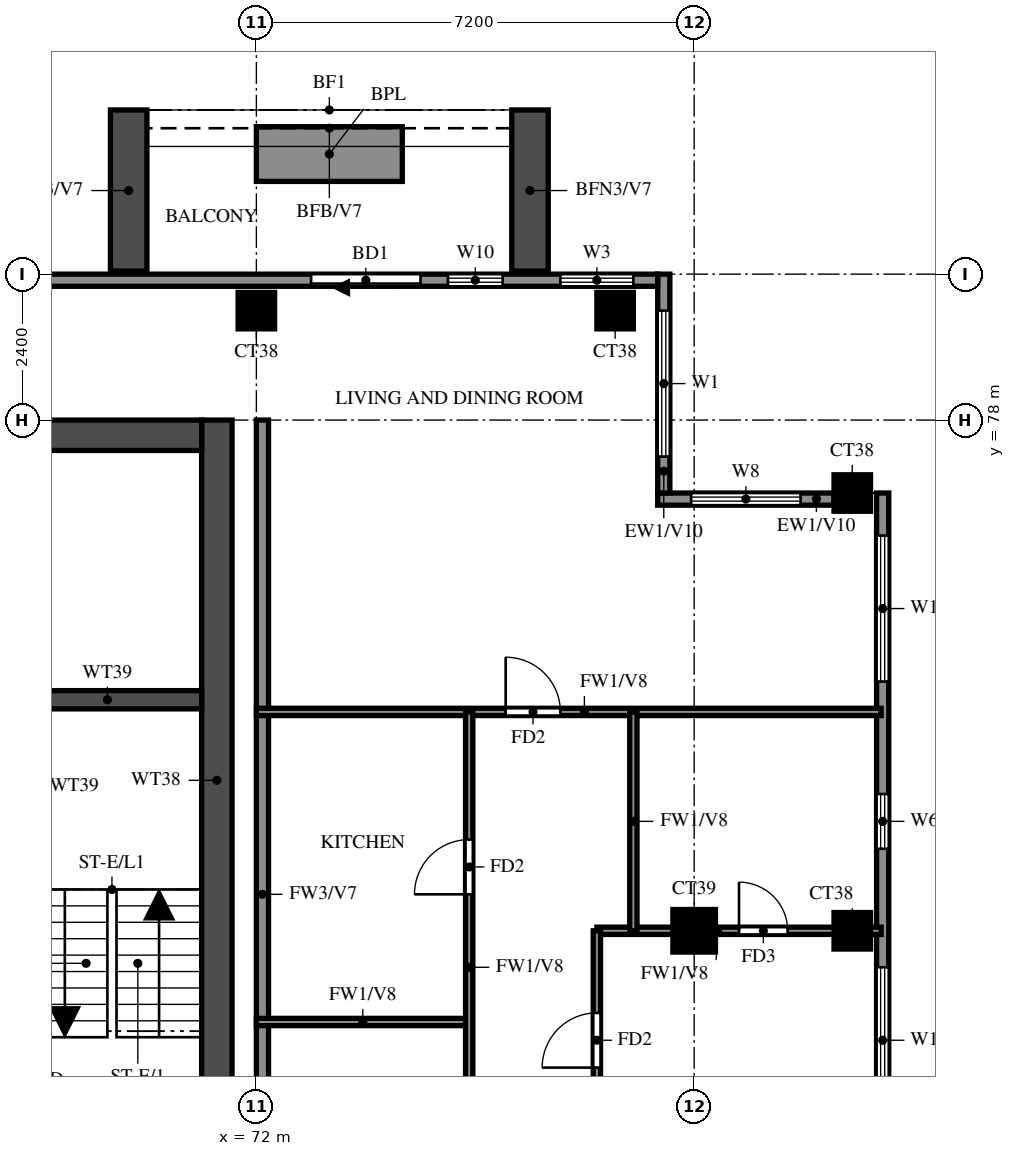
"""IFC4 building model, lengths in metres.
Left out: names, types, materials, properties, quantities, classifications, styles, units other than length and angle.
Written with IfcOpenShell. Run it as: python <this file> out.ifc"""

import sys

from ifc_helpers import new_model, si_unit, direction, frame, frame_2d, origin, origin_2d, place, context, subcontext, project, spatial, rectangle, extrude, source, transform, mapped, element, fill, save


model = new_model("IFC4")
c1 = context("Model", 3, precision=1e-05, world=origin(), true_north=direction((0.0, 1.0)))
c2 = subcontext(c1, "Body", "Model", "MODEL_VIEW")
j1 = project(units=[si_unit("LENGTHUNIT", "METRE"), si_unit("PLANEANGLEUNIT", "RADIAN")], contexts=[c1])
p1 = place(None, origin())
s1 = spatial("IfcSite", under=j1, at=p1, CompositionType="ELEMENT")
p2 = place(p1, origin())
s2 = spatial("IfcBuilding", under=s1, at=p2, CompositionType="ELEMENT")
p3 = place(p2, frame((0.0, 0.0, 267.5)))
s3 = spatial("IfcBuildingStorey", under=s2, at=p3, CompositionType="ELEMENT", Elevation=267.5)
m1 = source(origin(), c2, "Body", "SweptSolid", [
    extrude(rectangle(XDim=0.7, YDim=0.7, at=origin_2d()), origin(), (0.0, 0.0, 1.0), 3.099),
])
p4 = place(p3, frame((79.2, 69.6, 0.0), z_axis=(0.0, 0.0, 1.0), x_axis=(1.0, 0.0, 0.0)))
e1 = element("IfcColumn", 1, at=p4, inside=s3, PredefinedType="COLUMN", context=c2, shape_type="MappedRepresentation", body=[
    mapped(m1, transform((0.0, 0.0, 0.0))),
])
m2 = source(origin(), c2, "Body", "SweptSolid", [
    extrude(rectangle(XDim=0.6, YDim=0.6, at=origin_2d()), origin(), (0.0, 0.0, 1.0), 3.099),
])
for number, where, z_axis, x_axis in (
    (2, (81.8, 69.6, 0.0), (0.0, 0.0, 1.0), (1.0, 0.0, 0.0)),
    (3, (81.8, 76.8, 0.0), (0.0, 0.0, 1.0), (1.0, 0.0, 0.0)),
    (4, (72.0, 79.8, 0.0), (0.0, 0.0, 1.0), (1.0, 0.0, 0.0)),
    (5, (77.9, 79.8, 0.0), (0.0, 0.0, 1.0), (1.0, 0.0, 0.0)),
):
    element("IfcColumn", number, at=place(p3, frame(where, z_axis=z_axis, x_axis=x_axis)), inside=s3, PredefinedType="COLUMN", context=c2, shape_type="MappedRepresentation", body=[
        mapped(m2, transform((0.0, 0.0, 0.0))),
    ])
p5 = place(p3, frame((71.35, 66.15, 0.0), z_axis=(0.0, 0.0, 1.0), x_axis=(0.0, 1.0, 0.0)))
e6 = element("IfcWall", 6, at=p5, inside=s3, PredefinedType="SHEAR", context=c2, shape_type="SweptSolid", body=[
    extrude(rectangle(XDim=11.85, YDim=0.5, at=frame_2d((5.925, 0.0))), origin(), (0.0, 0.0, 1.0), 3.099),
])
p6 = place(p3, frame((29.7, 77.75, 0.0), z_axis=(0.0, 0.0, 1.0), x_axis=(1.0, 0.0, 0.0)))
e7 = element("IfcWall", 7, at=p6, inside=s3, PredefinedType="SHEAR", context=c2, shape_type="SweptSolid", body=[
    extrude(rectangle(XDim=41.4, YDim=0.5, at=frame_2d((20.7, 0.0))), origin(), (0.0, 0.0, 1.0), 3.099),
])
p7 = place(p3, frame((68.0, 73.4, 0.0), z_axis=(0.0, 0.0, 1.0), x_axis=(1.0, 0.0, 0.0)))
e8 = element("IfcWall", 8, at=p7, inside=s3, PredefinedType="SHEAR", context=c2, shape_type="SweptSolid", body=[
    extrude(rectangle(XDim=3.1, YDim=0.3, at=frame_2d((1.55, 0.0))), origin(), (0.0, 0.0, 1.0), 3.099),
])
p8 = place(p3, frame((82.3, 48.2, 0.0), z_axis=(0.0, 0.0, 1.0), x_axis=(0.0, 1.0, 0.0)))
e9 = element("IfcWall", 9, at=p8, inside=s3, PredefinedType="SOLIDWALL", context=c2, shape_type="SweptSolid", body=[
    extrude(rectangle(XDim=28.6, YDim=0.2, at=frame_2d((14.3, 0.0))), origin(), (0.0, 0.0, 1.0), 3.099),
])
p9 = place(p8, frame((7.9, 0.0, 0.0)))
e10 = element("IfcOpeningElement", 10, at=p9, cuts=e9, PredefinedType="OPENING", context=c2, shape_type="SweptSolid", body=[
    extrude(rectangle(XDim=1.8, YDim=2.4, at=frame_2d((0.9, 1.2))), frame((0.0, 0.11, 0.0), z_axis=(0.0, -1.0, 0.0), x_axis=(1.0, 0.0, 0.0)), (0.0, 0.0, 1.0), 0.22),
])
p10 = place(p8, frame((0.6, 0.0, 0.6)))
e11 = element("IfcOpeningElement", 11, at=p10, cuts=e9, PredefinedType="OPENING", context=c2, shape_type="SweptSolid", body=[
    extrude(rectangle(XDim=2.4, YDim=2.4, at=frame_2d((1.2, 1.2))), frame((0.0, 0.11, 0.0), z_axis=(0.0, -1.0, 0.0), x_axis=(1.0, 0.0, 0.0)), (0.0, 0.0, 1.0), 0.22),
])
p11 = place(p8, frame((3.55, 0.0, 0.6)))
e12 = element("IfcOpeningElement", 12, at=p11, cuts=e9, PredefinedType="OPENING", context=c2, shape_type="SweptSolid", body=[
    extrude(rectangle(XDim=0.9, YDim=2.4, at=frame_2d((0.45, 1.2))), frame((0.0, 0.11, 0.0), z_axis=(0.0, -1.0, 0.0), x_axis=(1.0, 0.0, 0.0)), (0.0, 0.0, 1.0), 0.22),
])
p12 = place(p8, frame((5.5, 0.0, 0.6)))
e13 = element("IfcOpeningElement", 13, at=p12, cuts=e9, PredefinedType="OPENING", context=c2, shape_type="SweptSolid", body=[
    extrude(rectangle(XDim=1.8, YDim=2.4, at=frame_2d((0.9, 1.2))), frame((0.0, 0.11, 0.0), z_axis=(0.0, -1.0, 0.0), x_axis=(1.0, 0.0, 0.0)), (0.0, 0.0, 1.0), 0.22),
])
p13 = place(p8, frame((12.1, 0.0, 0.6)))
e14 = element("IfcOpeningElement", 14, at=p13, cuts=e9, PredefinedType="OPENING", context=c2, shape_type="SweptSolid", body=[
    extrude(rectangle(XDim=1.8, YDim=2.4, at=frame_2d((0.9, 1.2))), frame((0.0, 0.11, 0.0), z_axis=(0.0, -1.0, 0.0), x_axis=(1.0, 0.0, 0.0)), (0.0, 0.0, 1.0), 0.22),
])
p14 = place(p8, frame((14.8, 0.0, 0.6)))
e15 = element("IfcOpeningElement", 15, at=p14, cuts=e9, PredefinedType="OPENING", context=c2, shape_type="SweptSolid", body=[
    extrude(rectangle(XDim=2.4, YDim=2.4, at=frame_2d((1.2, 1.2))), frame((0.0, 0.11, 0.0), z_axis=(0.0, -1.0, 0.0), x_axis=(1.0, 0.0, 0.0)), (0.0, 0.0, 1.0), 0.22),
])
p15 = place(p8, frame((18.4, 0.0, 0.6)))
e16 = element("IfcOpeningElement", 16, at=p15, cuts=e9, PredefinedType="OPENING", context=c2, shape_type="SweptSolid", body=[
    extrude(rectangle(XDim=2.4, YDim=2.4, at=frame_2d((1.2, 1.2))), frame((0.0, 0.11, 0.0), z_axis=(0.0, -1.0, 0.0), x_axis=(1.0, 0.0, 0.0)), (0.0, 0.0, 1.0), 0.22),
])
p16 = place(p8, frame((22.75, 0.0, 1.5)))
e17 = element("IfcOpeningElement", 17, at=p16, cuts=e9, PredefinedType="OPENING", context=c2, shape_type="SweptSolid", body=[
    extrude(rectangle(XDim=0.9, YDim=0.9, at=frame_2d((0.45, 0.45))), frame((0.0, 0.11, 0.0), z_axis=(0.0, -1.0, 0.0), x_axis=(1.0, 0.0, 0.0)), (0.0, 0.0, 1.0), 0.22),
])
p17 = place(p8, frame((25.5, 0.0, 0.6)))
e18 = element("IfcOpeningElement", 18, at=p17, cuts=e9, PredefinedType="OPENING", context=c2, shape_type="SweptSolid", body=[
    extrude(rectangle(XDim=2.4, YDim=2.4, at=frame_2d((1.2, 1.2))), frame((0.0, 0.11, 0.0), z_axis=(0.0, -1.0, 0.0), x_axis=(1.0, 0.0, 0.0)), (0.0, 0.0, 1.0), 0.22),
])
p18 = place(p3, frame((81.5, 76.7, 0.0), z_axis=(0.0, 0.0, 1.0), x_axis=(-1.0, 0.0, 0.0)))
e19 = element("IfcWall", 19, at=p18, inside=s3, PredefinedType="SOLIDWALL", context=c2, shape_type="SweptSolid", body=[
    extrude(rectangle(XDim=2.9, YDim=0.2, at=frame_2d((1.45, 0.0))), origin(), (0.0, 0.0, 1.0), 3.099),
])
p19 = place(p18, frame((0.55, 0.0, 0.6)))
e20 = element("IfcOpeningElement", 20, at=p19, cuts=e19, PredefinedType="OPENING", context=c2, shape_type="SweptSolid", body=[
    extrude(rectangle(XDim=1.8, YDim=2.4, at=frame_2d((0.9, 1.2))), frame((0.0, 0.11, 0.0), z_axis=(0.0, -1.0, 0.0), x_axis=(1.0, 0.0, 0.0)), (0.0, 0.0, 1.0), 0.22),
])
p20 = place(p3, frame((78.7, 76.8, 0.0), z_axis=(0.0, 0.0, 1.0), x_axis=(0.0, 1.0, 0.0)))
e21 = element("IfcWall", 21, at=p20, inside=s3, PredefinedType="SOLIDWALL", context=c2, shape_type="SweptSolid", body=[
    extrude(rectangle(XDim=3.6, YDim=0.2, at=frame_2d((1.8, 0.0))), origin(), (0.0, 0.0, 1.0), 3.099),
])
p21 = place(p20, frame((0.6, 0.0, 0.6)))
e22 = element("IfcOpeningElement", 22, at=p21, cuts=e21, PredefinedType="OPENING", context=c2, shape_type="SweptSolid", body=[
    extrude(rectangle(XDim=2.4, YDim=2.4, at=frame_2d((1.2, 1.2))), frame((0.0, 0.11, 0.0), z_axis=(0.0, -1.0, 0.0), x_axis=(1.0, 0.0, 0.0)), (0.0, 0.0, 1.0), 0.22),
])
p22 = place(p3, frame((78.6, 80.3, 0.0), z_axis=(0.0, 0.0, 1.0), x_axis=(-1.0, 0.0, 0.0)))
e23 = element("IfcWall", 23, at=p22, inside=s3, PredefinedType="SOLIDWALL", context=c2, shape_type="SweptSolid", body=[
    extrude(rectangle(XDim=56.6, YDim=0.2, at=frame_2d((28.3, 0.0))), origin(), (0.0, 0.0, 1.0), 3.099),
])
p23 = place(p22, frame((3.9, 0.0, 0.0)))
e24 = element("IfcOpeningElement", 24, at=p23, cuts=e23, PredefinedType="OPENING", context=c2, shape_type="SweptSolid", body=[
    extrude(rectangle(XDim=1.8, YDim=2.4, at=frame_2d((0.9, 1.2))), frame((0.0, 0.11, 0.0), z_axis=(0.0, -1.0, 0.0), x_axis=(1.0, 0.0, 0.0)), (0.0, 0.0, 1.0), 0.22),
])
p24 = place(p22, frame((50.433, 0.0, 0.6)))
e25 = element("IfcOpeningElement", 25, at=p24, cuts=e23, PredefinedType="OPENING", context=c2, shape_type="SweptSolid", body=[
    extrude(rectangle(XDim=2.4, YDim=2.4, at=frame_2d((1.2, 1.2))), frame((0.0, 0.11, 0.0), z_axis=(0.0, -1.0, 0.0), x_axis=(1.0, 0.0, 0.0)), (0.0, 0.0, 1.0), 0.22),
])
p25 = place(p22, frame((53.367, 0.0, 0.6)))
e26 = element("IfcOpeningElement", 26, at=p25, cuts=e23, PredefinedType="OPENING", context=c2, shape_type="SweptSolid", body=[
    extrude(rectangle(XDim=2.4, YDim=2.4, at=frame_2d((1.2, 1.2))), frame((0.0, 0.11, 0.0), z_axis=(0.0, -1.0, 0.0), x_axis=(1.0, 0.0, 0.0)), (0.0, 0.0, 1.0), 0.22),
])
p26 = place(p22, frame((0.4, 0.0, 0.6)))
e27 = element("IfcOpeningElement", 27, at=p26, cuts=e23, PredefinedType="OPENING", context=c2, shape_type="SweptSolid", body=[
    extrude(rectangle(XDim=1.2, YDim=2.4, at=frame_2d((0.6, 1.2))), frame((0.0, 0.11, 0.0), z_axis=(0.0, -1.0, 0.0), x_axis=(1.0, 0.0, 0.0)), (0.0, 0.0, 1.0), 0.22),
])
p27 = place(p22, frame((2.55, 0.0, 0.6)))
e28 = element("IfcOpeningElement", 28, at=p27, cuts=e23, PredefinedType="OPENING", context=c2, shape_type="SweptSolid", body=[
    extrude(rectangle(XDim=0.9, YDim=2.4, at=frame_2d((0.45, 1.2))), frame((0.0, 0.11, 0.0), z_axis=(0.0, -1.0, 0.0), x_axis=(1.0, 0.0, 0.0)), (0.0, 0.0, 1.0), 0.22),
])
for number, where, z_axis, x_axis in (
    (29, (76.5, 80.45, 0.0), (0.0, 0.0, 1.0), (0.0, 1.0, 0.0)),
    (30, (69.9, 80.45, 0.0), (0.0, 0.0, 1.0), (0.0, 1.0, 0.0)),
):
    element("IfcWall", number, at=place(p3, frame(where, z_axis=z_axis, x_axis=x_axis)), inside=s3, PredefinedType="SOLIDWALL", context=c2, shape_type="SweptSolid", body=[
        extrude(rectangle(XDim=2.65, YDim=0.6, at=frame_2d((1.325, 0.0))), origin(), (0.0, 0.0, 1.0), 2.729),
    ])
p28 = place(p3, frame((74.4, 82.375, 0.0), z_axis=(0.0, 0.0, 1.0), x_axis=(-1.0, 0.0, 0.0)))
e31 = element("IfcWall", 31, at=p28, inside=s3, PredefinedType="SOLIDWALL", context=c2, shape_type="SweptSolid", body=[
    extrude(rectangle(XDim=2.4, YDim=0.9, at=frame_2d((1.2, 0.0))), origin(), (0.0, 0.0, 1.0), 0.9),
])
p29 = place(p3, frame((72.1, 62.4, 0.0), z_axis=(0.0, 0.0, 1.0), x_axis=(0.0, 1.0, 0.0)))
e32 = element("IfcWall", 32, at=p29, inside=s3, PredefinedType="SOLIDWALL", context=c2, shape_type="SweptSolid", body=[
    extrude(rectangle(XDim=15.6, YDim=0.2, at=frame_2d((7.8, 0.0))), origin(), (0.0, 0.0, 1.0), 3.099),
])
p30 = place(p3, frame((72.0, 68.1, 0.0), z_axis=(0.0, 0.0, 1.0), x_axis=(1.0, 0.0, 0.0)))
e33 = element("IfcWall", 33, at=p30, inside=s3, PredefinedType="PARTITIONING", context=c2, shape_type="SweptSolid", body=[
    extrude(rectangle(XDim=3.5, YDim=0.12, at=frame_2d((1.75, 0.0))), origin(), (0.0, 0.0, 1.0), 3.099),
])
p31 = place(p3, frame((77.6, 69.6, 0.0), z_axis=(0.0, 0.0, 1.0), x_axis=(1.0, 0.0, 0.0)))
e34 = element("IfcWall", 34, at=p31, inside=s3, PredefinedType="PARTITIONING", context=c2, shape_type="SweptSolid", body=[
    extrude(rectangle(XDim=4.675, YDim=0.12, at=frame_2d((2.337, 0.0))), origin(), (0.0, 0.0, 1.0), 3.099),
])
p32 = place(p31, frame((2.337, 0.0, 0.0)))
e35 = element("IfcOpeningElement", 35, at=p32, cuts=e34, PredefinedType="OPENING", context=c2, shape_type="SweptSolid", body=[
    extrude(rectangle(XDim=0.8, YDim=2.1, at=frame_2d((0.4, 1.05))), frame((0.0, 0.07, 0.0), z_axis=(0.0, -1.0, 0.0), x_axis=(1.0, 0.0, 0.0)), (0.0, 0.0, 1.0), 0.14),
])
p33 = place(p3, frame((72.0, 73.2, 0.0), z_axis=(0.0, 0.0, 1.0), x_axis=(1.0, 0.0, 0.0)))
e36 = element("IfcWall", 36, at=p33, inside=s3, PredefinedType="PARTITIONING", context=c2, shape_type="SweptSolid", body=[
    extrude(rectangle(XDim=10.275, YDim=0.12, at=frame_2d((5.137, 0.0))), origin(), (0.0, 0.0, 1.0), 3.099),
])
p34 = place(p33, frame((4.1, 0.0, 0.0)))
e37 = element("IfcOpeningElement", 37, at=p34, cuts=e36, PredefinedType="OPENING", context=c2, shape_type="SweptSolid", body=[
    extrude(rectangle(XDim=0.9, YDim=2.1, at=frame_2d((0.45, 1.05))), frame((0.0, 0.07, 0.0), z_axis=(0.0, -1.0, 0.0), x_axis=(1.0, 0.0, 0.0)), (0.0, 0.0, 1.0), 0.14),
])
p35 = place(p3, frame((75.5, 64.8, 0.0), z_axis=(0.0, 0.0, 1.0), x_axis=(0.0, 1.0, 0.0)))
e38 = element("IfcWall", 38, at=p35, inside=s3, PredefinedType="PARTITIONING", context=c2, shape_type="SweptSolid", body=[
    extrude(rectangle(XDim=8.4, YDim=0.12, at=frame_2d((4.2, 0.0))), origin(), (0.0, 0.0, 1.0), 3.099),
])
p36 = place(p35, frame((5.4, 0.0, 0.0)))
e39 = element("IfcOpeningElement", 39, at=p36, cuts=e38, PredefinedType="OPENING", context=c2, shape_type="SweptSolid", body=[
    extrude(rectangle(XDim=0.9, YDim=2.1, at=frame_2d((0.45, 1.05))), frame((0.0, 0.07, 0.0), z_axis=(0.0, -1.0, 0.0), x_axis=(1.0, 0.0, 0.0)), (0.0, 0.0, 1.0), 0.14),
])
p37 = place(p3, frame((77.6, 48.125, 0.0), z_axis=(0.0, 0.0, 1.0), x_axis=(0.0, 1.0, 0.0)))
e40 = element("IfcWall", 40, at=p37, inside=s3, PredefinedType="PARTITIONING", context=c2, shape_type="SweptSolid", body=[
    extrude(rectangle(XDim=21.475, YDim=0.12, at=frame_2d((10.738, 0.0))), origin(), (0.0, 0.0, 1.0), 3.099),
])
p38 = place(p37, frame((1.288, 0.0, 0.0)))
e41 = element("IfcOpeningElement", 41, at=p38, cuts=e40, PredefinedType="OPENING", context=c2, shape_type="SweptSolid", body=[
    extrude(rectangle(XDim=0.9, YDim=2.1, at=frame_2d((0.45, 1.05))), frame((0.0, 0.07, 0.0), z_axis=(0.0, -1.0, 0.0), x_axis=(1.0, 0.0, 0.0)), (0.0, 0.0, 1.0), 0.14),
])
p39 = place(p37, frame((7.825, 0.0, 0.0)))
e42 = element("IfcOpeningElement", 42, at=p39, cuts=e40, PredefinedType="OPENING", context=c2, shape_type="SweptSolid", body=[
    extrude(rectangle(XDim=1.5, YDim=2.1, at=frame_2d((0.75, 1.05))), frame((0.0, 0.07, 0.0), z_axis=(0.0, -1.0, 0.0), x_axis=(1.0, 0.0, 0.0)), (0.0, 0.0, 1.0), 0.14),
])
p40 = place(p37, frame((12.025, 0.0, 0.0)))
e43 = element("IfcOpeningElement", 43, at=p40, cuts=e40, PredefinedType="OPENING", context=c2, shape_type="SweptSolid", body=[
    extrude(rectangle(XDim=0.9, YDim=2.1, at=frame_2d((0.45, 1.05))), frame((0.0, 0.07, 0.0), z_axis=(0.0, -1.0, 0.0), x_axis=(1.0, 0.0, 0.0)), (0.0, 0.0, 1.0), 0.14),
])
p41 = place(p37, frame((15.625, 0.0, 0.0)))
e44 = element("IfcOpeningElement", 44, at=p41, cuts=e40, PredefinedType="OPENING", context=c2, shape_type="SweptSolid", body=[
    extrude(rectangle(XDim=0.9, YDim=2.1, at=frame_2d((0.45, 1.05))), frame((0.0, 0.07, 0.0), z_axis=(0.0, -1.0, 0.0), x_axis=(1.0, 0.0, 0.0)), (0.0, 0.0, 1.0), 0.14),
])
p42 = place(p37, frame((19.225, 0.0, 0.0)))
e45 = element("IfcOpeningElement", 45, at=p42, cuts=e40, PredefinedType="OPENING", context=c2, shape_type="SweptSolid", body=[
    extrude(rectangle(XDim=0.9, YDim=2.1, at=frame_2d((0.45, 1.05))), frame((0.0, 0.07, 0.0), z_axis=(0.0, -1.0, 0.0), x_axis=(1.0, 0.0, 0.0)), (0.0, 0.0, 1.0), 0.14),
])
p43 = place(p3, frame((78.2, 69.6, 0.0), z_axis=(0.0, 0.0, 1.0), x_axis=(0.0, 1.0, 0.0)))
e46 = element("IfcWall", 46, at=p43, inside=s3, PredefinedType="PARTITIONING", context=c2, shape_type="SweptSolid", body=[
    extrude(rectangle(XDim=3.6, YDim=0.12, at=frame_2d((1.8, 0.0))), origin(), (0.0, 0.0, 1.0), 3.099),
])
p44 = place(p15, origin())
e47 = element("IfcWindow", 47, at=p44, inside=s3, PartitioningType="DOUBLE_PANEL_VERTICAL", PredefinedType="WINDOW", context=c2, shape_type="SweptSolid", body=[
    extrude(rectangle(XDim=2.4, YDim=2.4, at=frame_2d((1.2, 1.2))), frame((0.0, 0.03, 0.0), z_axis=(0.0, -1.0, 0.0), x_axis=(1.0, 0.0, 0.0)), (0.0, 0.0, 1.0), 0.06),
])
fill(e16, e47)
p45 = place(p16, origin())
e48 = element("IfcWindow", 48, at=p45, inside=s3, PartitioningType="SINGLE_PANEL", PredefinedType="WINDOW", context=c2, shape_type="SweptSolid", body=[
    extrude(rectangle(XDim=0.9, YDim=0.9, at=frame_2d((0.45, 0.45))), frame((0.0, 0.03, 0.0), z_axis=(0.0, -1.0, 0.0), x_axis=(1.0, 0.0, 0.0)), (0.0, 0.0, 1.0), 0.06),
])
fill(e17, e48)
p46 = place(p17, origin())
e49 = element("IfcWindow", 49, at=p46, inside=s3, PartitioningType="DOUBLE_PANEL_VERTICAL", PredefinedType="WINDOW", context=c2, shape_type="SweptSolid", body=[
    extrude(rectangle(XDim=2.4, YDim=2.4, at=frame_2d((1.2, 1.2))), frame((0.0, 0.03, 0.0), z_axis=(0.0, -1.0, 0.0), x_axis=(1.0, 0.0, 0.0)), (0.0, 0.0, 1.0), 0.06),
])
fill(e18, e49)
p47 = place(p19, origin())
e50 = element("IfcWindow", 50, at=p47, inside=s3, PartitioningType="DOUBLE_PANEL_VERTICAL", PredefinedType="WINDOW", context=c2, shape_type="SweptSolid", body=[
    extrude(rectangle(XDim=1.8, YDim=2.4, at=frame_2d((0.9, 1.2))), frame((0.0, 0.03, 0.0), z_axis=(0.0, -1.0, 0.0), x_axis=(1.0, 0.0, 0.0)), (0.0, 0.0, 1.0), 0.06),
])
fill(e20, e50)
p48 = place(p21, origin())
e51 = element("IfcWindow", 51, at=p48, inside=s3, PartitioningType="DOUBLE_PANEL_VERTICAL", PredefinedType="WINDOW", context=c2, shape_type="SweptSolid", body=[
    extrude(rectangle(XDim=2.4, YDim=2.4, at=frame_2d((1.2, 1.2))), frame((0.0, 0.03, 0.0), z_axis=(0.0, -1.0, 0.0), x_axis=(1.0, 0.0, 0.0)), (0.0, 0.0, 1.0), 0.06),
])
fill(e22, e51)
p49 = place(p23, origin())
e52 = element("IfcDoor", 52, at=p49, inside=s3, OperationType="DOUBLE_DOOR_SLIDING", PredefinedType="DOOR", context=c2, shape_type="SweptSolid", body=[
    extrude(rectangle(XDim=1.8, YDim=2.4, at=frame_2d((0.9, 1.2))), frame((0.0, 0.025, 0.0), z_axis=(0.0, -1.0, 0.0), x_axis=(1.0, 0.0, 0.0)), (0.0, 0.0, 1.0), 0.05),
])
fill(e24, e52)
p50 = place(p26, origin())
e53 = element("IfcWindow", 53, at=p50, inside=s3, PartitioningType="SINGLE_PANEL", PredefinedType="WINDOW", context=c2, shape_type="SweptSolid", body=[
    extrude(rectangle(XDim=1.2, YDim=2.4, at=frame_2d((0.6, 1.2))), frame((0.0, 0.03, 0.0), z_axis=(0.0, -1.0, 0.0), x_axis=(1.0, 0.0, 0.0)), (0.0, 0.0, 1.0), 0.06),
])
fill(e27, e53)
p51 = place(p27, origin())
e54 = element("IfcWindow", 54, at=p51, inside=s3, PartitioningType="SINGLE_PANEL", PredefinedType="WINDOW", context=c2, shape_type="SweptSolid", body=[
    extrude(rectangle(XDim=0.9, YDim=2.4, at=frame_2d((0.45, 1.2))), frame((0.0, 0.03, 0.0), z_axis=(0.0, -1.0, 0.0), x_axis=(1.0, 0.0, 0.0)), (0.0, 0.0, 1.0), 0.06),
])
fill(e28, e54)
p52 = place(p42, origin())
e55 = element("IfcDoor", 55, at=p52, inside=s3, OperationType="SINGLE_SWING_LEFT", PredefinedType="DOOR", context=c2, shape_type="SweptSolid", body=[
    extrude(rectangle(XDim=0.9, YDim=2.1, at=frame_2d((0.45, 1.05))), frame((0.0, 0.025, 0.0), z_axis=(0.0, -1.0, 0.0), x_axis=(1.0, 0.0, 0.0)), (0.0, 0.0, 1.0), 0.05),
])
fill(e45, e55)
p53 = place(p32, origin())
e56 = element("IfcDoor", 56, at=p53, inside=s3, OperationType="SINGLE_SWING_LEFT", PredefinedType="DOOR", context=c2, shape_type="SweptSolid", body=[
    extrude(rectangle(XDim=0.8, YDim=2.1, at=frame_2d((0.4, 1.05))), frame((0.0, 0.025, 0.0), z_axis=(0.0, -1.0, 0.0), x_axis=(1.0, 0.0, 0.0)), (0.0, 0.0, 1.0), 0.05),
])
fill(e35, e56)
p54 = place(p34, origin())
e57 = element("IfcDoor", 57, at=p54, inside=s3, OperationType="SINGLE_SWING_LEFT", PredefinedType="DOOR", context=c2, shape_type="SweptSolid", body=[
    extrude(rectangle(XDim=0.9, YDim=2.1, at=frame_2d((0.45, 1.05))), frame((0.0, 0.025, 0.0), z_axis=(0.0, -1.0, 0.0), x_axis=(1.0, 0.0, 0.0)), (0.0, 0.0, 1.0), 0.05),
])
fill(e37, e57)
p55 = place(p36, origin())
e58 = element("IfcDoor", 58, at=p55, inside=s3, OperationType="SINGLE_SWING_RIGHT", PredefinedType="DOOR", context=c2, shape_type="SweptSolid", body=[
    extrude(rectangle(XDim=0.9, YDim=2.1, at=frame_2d((0.45, 1.05))), frame((0.0, 0.025, 0.0), z_axis=(0.0, -1.0, 0.0), x_axis=(1.0, 0.0, 0.0)), (0.0, 0.0, 1.0), 0.05),
])
fill(e39, e58)
save(model, sys.argv[1])
